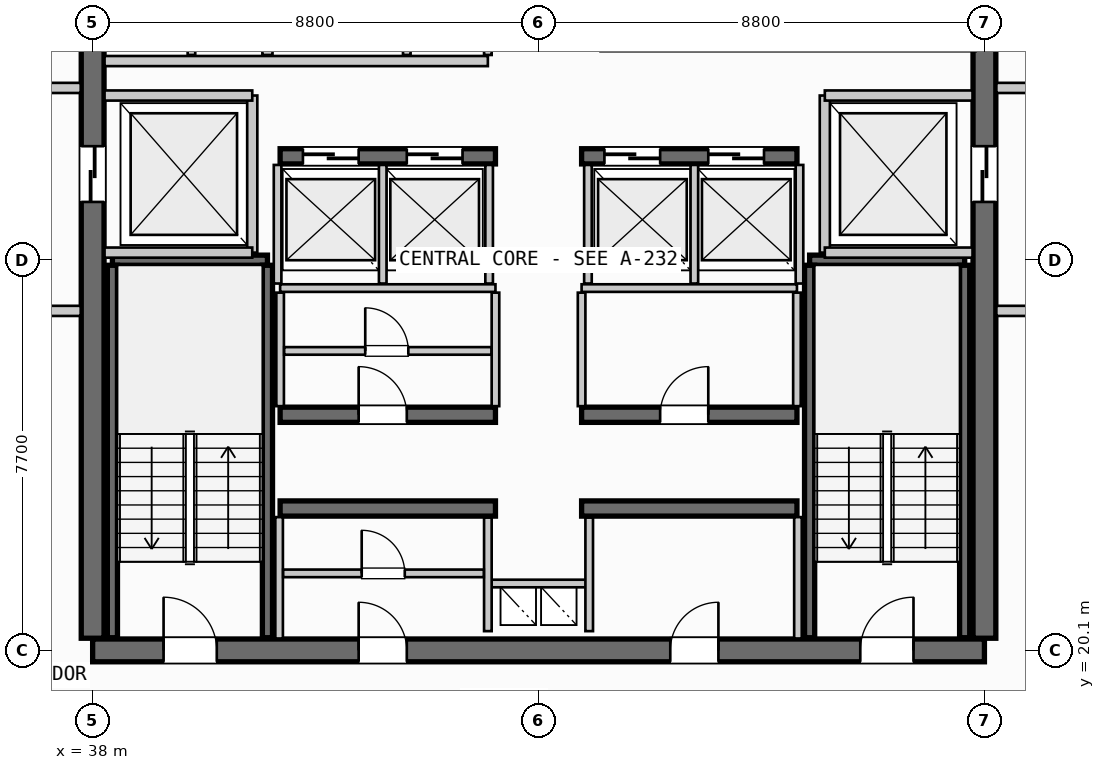
"""IFC4 building model, lengths in metres.
Left out: names, types, materials, properties, quantities, classifications, styles, units other than length and angle.
Written with IfcOpenShell. Run it as: python <this file> out.ifc"""

import sys

from ifc_helpers import new_model, si_unit, direction, frame, frame_2d, origin, place, context, subcontext, project, spatial, rectangle, extrude, source, transform, mapped, element, fill, save


model = new_model("IFC4")
c1 = context("Model", 3, precision=1e-05, world=origin(), true_north=direction((0.0, 1.0)))
c2 = subcontext(c1, "Body", "Model", "MODEL_VIEW")
j1 = project(units=[si_unit("LENGTHUNIT", "METRE"), si_unit("PLANEANGLEUNIT", "RADIAN")], contexts=[c1])
p1 = place(None, origin())
s1 = spatial("IfcSite", under=j1, at=p1, CompositionType="ELEMENT")
p2 = place(p1, origin())
s2 = spatial("IfcBuilding", under=s1, at=p2, CompositionType="ELEMENT")
p3 = place(p2, frame((0.0, 0.0, 231.85)))
s3 = spatial("IfcBuildingStorey", under=s2, at=p3, CompositionType="ELEMENT", Elevation=231.85)
p4 = place(p3, frame((38.0, 20.1, 0.0), z_axis=(0.0, 0.0, 1.0), x_axis=(1.0, 0.0, 0.0)))
e1 = element("IfcWall", 1, at=p4, inside=s3, PredefinedType="SHEAR", context=c2, shape_type="SweptSolid", body=[
    extrude(rectangle(XDim=17.6, YDim=0.45, at=frame_2d((8.8, 0.0))), origin(), (0.0, 0.0, 1.0), 3.21),
])
p5 = place(p4, frame((1.4, 0.0, 0.0)))
e2 = element("IfcOpeningElement", 2, at=p5, cuts=e1, PredefinedType="OPENING", context=c2, shape_type="SweptSolid", body=[
    extrude(rectangle(XDim=1.05, YDim=2.15, at=frame_2d((0.525, 1.075))), frame((0.0, 0.235, 0.0), z_axis=(0.0, -1.0, 0.0), x_axis=(1.0, 0.0, 0.0)), (0.0, 0.0, 1.0), 0.47),
])
p6 = place(p4, frame((15.15, 0.0, 0.0)))
e3 = element("IfcOpeningElement", 3, at=p6, cuts=e1, PredefinedType="OPENING", context=c2, shape_type="SweptSolid", body=[
    extrude(rectangle(XDim=1.05, YDim=2.15, at=frame_2d((0.525, 1.075))), frame((0.0, 0.235, 0.0), z_axis=(0.0, -1.0, 0.0), x_axis=(1.0, 0.0, 0.0)), (0.0, 0.0, 1.0), 0.47),
])
p7 = place(p4, frame((5.25, 0.0, 0.0)))
e4 = element("IfcOpeningElement", 4, at=p7, cuts=e1, PredefinedType="OPENING", context=c2, shape_type="SweptSolid", body=[
    extrude(rectangle(XDim=0.95, YDim=2.15, at=frame_2d((0.475, 1.075))), frame((0.0, 0.235, 0.0), z_axis=(0.0, -1.0, 0.0), x_axis=(1.0, 0.0, 0.0)), (0.0, 0.0, 1.0), 0.47),
])
p8 = place(p4, frame((11.4, 0.0, 0.0)))
e5 = element("IfcOpeningElement", 5, at=p8, cuts=e1, PredefinedType="OPENING", context=c2, shape_type="SweptSolid", body=[
    extrude(rectangle(XDim=0.95, YDim=2.15, at=frame_2d((0.475, 1.075))), frame((0.0, 0.235, 0.0), z_axis=(0.0, -1.0, 0.0), x_axis=(1.0, 0.0, 0.0)), (0.0, 0.0, 1.0), 0.47),
])
p9 = place(p3, frame((38.0, 35.26, 0.0), z_axis=(0.0, 0.0, 1.0), x_axis=(0.0, -1.0, 0.0)))
e6 = element("IfcWall", 6, at=p9, inside=s3, PredefinedType="SHEAR", context=c2, shape_type="SweptSolid", body=[
    extrude(rectangle(XDim=14.92, YDim=0.45, at=frame_2d((7.46, 0.0))), origin(), (0.0, 0.0, 1.0), 3.21),
])
p10 = place(p9, frame((5.21, 0.0, 0.0)))
e7 = element("IfcOpeningElement", 7, at=p10, cuts=e6, PredefinedType="OPENING", context=c2, shape_type="SweptSolid", body=[
    extrude(rectangle(XDim=1.1, YDim=2.2, at=frame_2d((0.55, 1.1))), frame((0.0, 0.235, 0.0), z_axis=(0.0, -1.0, 0.0), x_axis=(1.0, 0.0, 0.0)), (0.0, 0.0, 1.0), 0.47),
])
p11 = place(p3, frame((55.6, 20.34, 0.0), z_axis=(0.0, 0.0, 1.0), x_axis=(0.0, 1.0, 0.0)))
e8 = element("IfcWall", 8, at=p11, inside=s3, PredefinedType="SHEAR", context=c2, shape_type="SweptSolid", body=[
    extrude(rectangle(XDim=14.92, YDim=0.45, at=frame_2d((7.46, 0.0))), origin(), (0.0, 0.0, 1.0), 3.21),
])
p12 = place(p11, frame((12.71, 0.0, 0.0)))
e9 = element("IfcOpeningElement", 9, at=p12, cuts=e8, PredefinedType="OPENING", context=c2, shape_type="SweptSolid", body=[
    extrude(rectangle(XDim=1.05, YDim=2.15, at=frame_2d((0.525, 1.075))), frame((0.0, 0.235, 0.0), z_axis=(0.0, -1.0, 0.0), x_axis=(1.0, 0.0, 0.0)), (0.0, 0.0, 1.0), 0.47),
])
p13 = place(p11, frame((8.61, 0.0, 0.0)))
e10 = element("IfcOpeningElement", 10, at=p13, cuts=e8, PredefinedType="OPENING", context=c2, shape_type="SweptSolid", body=[
    extrude(rectangle(XDim=1.1, YDim=2.2, at=frame_2d((0.55, 1.1))), frame((0.0, 0.235, 0.0), z_axis=(0.0, -1.0, 0.0), x_axis=(1.0, 0.0, 0.0)), (0.0, 0.0, 1.0), 0.47),
])
for number, where, z_axis, x_axis in (
    (11, (41.7, 22.9, 0.0), (0.0, 0.0, 1.0), (1.0, 0.0, 0.0)),
    (12, (47.65, 22.9, 0.0), (0.0, 0.0, 1.0), (1.0, 0.0, 0.0)),
):
    element("IfcWall", number, at=place(p3, frame(where, z_axis=z_axis, x_axis=x_axis)), inside=s3, PredefinedType="SHEAR", context=c2, shape_type="SweptSolid", body=[
        extrude(rectangle(XDim=4.25, YDim=0.3, at=frame_2d((2.125, 0.0))), origin(), (0.0, 0.0, 1.0), 3.21),
    ])
p14 = place(p3, frame((41.7, 24.75, 0.0), z_axis=(0.0, 0.0, 1.0), x_axis=(1.0, 0.0, 0.0)))
e13 = element("IfcWall", 13, at=p14, inside=s3, PredefinedType="SHEAR", context=c2, shape_type="SweptSolid", body=[
    extrude(rectangle(XDim=4.25, YDim=0.3, at=frame_2d((2.125, 0.0))), origin(), (0.0, 0.0, 1.0), 3.21),
])
p15 = place(p14, frame((1.55, 0.0, 0.0)))
e14 = element("IfcOpeningElement", 14, at=p15, cuts=e13, PredefinedType="OPENING", context=c2, shape_type="SweptSolid", body=[
    extrude(rectangle(XDim=0.95, YDim=2.15, at=frame_2d((0.475, 1.075))), frame((0.0, 0.16, 0.0), z_axis=(0.0, -1.0, 0.0), x_axis=(1.0, 0.0, 0.0)), (0.0, 0.0, 1.0), 0.32),
])
p16 = place(p3, frame((47.65, 24.75, 0.0), z_axis=(0.0, 0.0, 1.0), x_axis=(1.0, 0.0, 0.0)))
e15 = element("IfcWall", 15, at=p16, inside=s3, PredefinedType="SHEAR", context=c2, shape_type="SweptSolid", body=[
    extrude(rectangle(XDim=4.25, YDim=0.3, at=frame_2d((2.125, 0.0))), origin(), (0.0, 0.0, 1.0), 3.21),
])
p17 = place(p16, frame((1.55, 0.0, 0.0)))
e16 = element("IfcOpeningElement", 16, at=p17, cuts=e15, PredefinedType="OPENING", context=c2, shape_type="SweptSolid", body=[
    extrude(rectangle(XDim=0.95, YDim=2.15, at=frame_2d((0.475, 1.075))), frame((0.0, 0.16, 0.0), z_axis=(0.0, -1.0, 0.0), x_axis=(1.0, 0.0, 0.0)), (0.0, 0.0, 1.0), 0.32),
])
p18 = place(p3, frame((41.7, 29.85, 0.0), z_axis=(0.0, 0.0, 1.0), x_axis=(1.0, 0.0, 0.0)))
e17 = element("IfcWall", 17, at=p18, inside=s3, PredefinedType="SHEAR", context=c2, shape_type="SweptSolid", body=[
    extrude(rectangle(XDim=4.25, YDim=0.3, at=frame_2d((2.125, 0.0))), origin(), (0.0, 0.0, 1.0), 3.21),
])
p19 = place(p18, frame((0.45, 0.0, 0.0)))
e18 = element("IfcOpeningElement", 18, at=p19, cuts=e17, PredefinedType="OPENING", context=c2, shape_type="SweptSolid", body=[
    extrude(rectangle(XDim=1.1, YDim=2.2, at=frame_2d((0.55, 1.1))), frame((0.0, 0.16, 0.0), z_axis=(0.0, -1.0, 0.0), x_axis=(1.0, 0.0, 0.0)), (0.0, 0.0, 1.0), 0.32),
])
p20 = place(p18, frame((2.5, 0.0, 0.0)))
e19 = element("IfcOpeningElement", 19, at=p20, cuts=e17, PredefinedType="OPENING", context=c2, shape_type="SweptSolid", body=[
    extrude(rectangle(XDim=1.1, YDim=2.2, at=frame_2d((0.55, 1.1))), frame((0.0, 0.16, 0.0), z_axis=(0.0, -1.0, 0.0), x_axis=(1.0, 0.0, 0.0)), (0.0, 0.0, 1.0), 0.32),
])
p21 = place(p3, frame((47.65, 29.85, 0.0), z_axis=(0.0, 0.0, 1.0), x_axis=(1.0, 0.0, 0.0)))
e20 = element("IfcWall", 20, at=p21, inside=s3, PredefinedType="SHEAR", context=c2, shape_type="SweptSolid", body=[
    extrude(rectangle(XDim=4.25, YDim=0.3, at=frame_2d((2.125, 0.0))), origin(), (0.0, 0.0, 1.0), 3.21),
])
p22 = place(p21, frame((0.45, 0.0, 0.0)))
e21 = element("IfcOpeningElement", 21, at=p22, cuts=e20, PredefinedType="OPENING", context=c2, shape_type="SweptSolid", body=[
    extrude(rectangle(XDim=1.1, YDim=2.2, at=frame_2d((0.55, 1.1))), frame((0.0, 0.16, 0.0), z_axis=(0.0, -1.0, 0.0), x_axis=(1.0, 0.0, 0.0)), (0.0, 0.0, 1.0), 0.32),
])
p23 = place(p21, frame((2.5, 0.0, 0.0)))
e22 = element("IfcOpeningElement", 22, at=p23, cuts=e20, PredefinedType="OPENING", context=c2, shape_type="SweptSolid", body=[
    extrude(rectangle(XDim=1.1, YDim=2.2, at=frame_2d((0.55, 1.1))), frame((0.0, 0.16, 0.0), z_axis=(0.0, -1.0, 0.0), x_axis=(1.0, 0.0, 0.0)), (0.0, 0.0, 1.0), 0.32),
])
p24 = place(p3, frame((38.39, 27.8, 0.0), z_axis=(0.0, 0.0, 1.0), x_axis=(1.0, 0.0, 0.0)))
e23 = element("IfcWall", 23, at=p24, inside=s3, PredefinedType="SHEAR", context=c2, shape_type="SweptSolid", body=[
    extrude(rectangle(XDim=3.06, YDim=0.2, at=frame_2d((1.53, 0.0))), origin(), (0.0, 0.0, 1.0), 3.21),
])
for number, where, z_axis, x_axis in (
    (24, (41.45, 27.7, 0.0), (0.0, 0.0, 1.0), (0.0, -1.0, 0.0)),
    (25, (38.39, 20.35, 0.0), (0.0, 0.0, 1.0), (0.0, 1.0, 0.0)),
):
    element("IfcWall", number, at=place(p3, frame(where, z_axis=z_axis, x_axis=x_axis)), inside=s3, PredefinedType="SHEAR", context=c2, shape_type="SweptSolid", body=[
        extrude(rectangle(XDim=7.35, YDim=0.2, at=frame_2d((3.675, 0.0))), origin(), (0.0, 0.0, 1.0), 3.21),
    ])
p25 = place(p3, frame((52.15, 27.8, 0.0), z_axis=(0.0, 0.0, 1.0), x_axis=(1.0, 0.0, 0.0)))
e26 = element("IfcWall", 26, at=p25, inside=s3, PredefinedType="SHEAR", context=c2, shape_type="SweptSolid", body=[
    extrude(rectangle(XDim=3.06, YDim=0.2, at=frame_2d((1.53, 0.0))), origin(), (0.0, 0.0, 1.0), 3.21),
])
for number, where, z_axis, x_axis in (
    (27, (55.21, 27.7, 0.0), (0.0, 0.0, 1.0), (0.0, -1.0, 0.0)),
    (28, (52.15, 20.35, 0.0), (0.0, 0.0, 1.0), (0.0, 1.0, 0.0)),
):
    element("IfcWall", number, at=place(p3, frame(where, z_axis=z_axis, x_axis=x_axis)), inside=s3, PredefinedType="SHEAR", context=c2, shape_type="SweptSolid", body=[
        extrude(rectangle(XDim=7.35, YDim=0.2, at=frame_2d((3.675, 0.0))), origin(), (0.0, 0.0, 1.0), 3.21),
    ])
p26 = place(p3, frame((45.8, 21.42, 0.0), z_axis=(0.0, 0.0, 1.0), x_axis=(1.0, 0.0, 0.0)))
e29 = element("IfcWall", 29, at=p26, inside=s3, PredefinedType="PARTITIONING", context=c2, shape_type="SweptSolid", body=[
    extrude(rectangle(XDim=2.0, YDim=0.15, at=frame_2d((1.0, 0.0))), origin(), (0.0, 0.0, 1.0), 2.28),
])
for number, where, z_axis, x_axis in (
    (30, (45.8, 20.48, 0.0), (0.0, 0.0, 1.0), (0.0, 1.0, 0.0)),
    (31, (47.8, 20.48, 0.0), (0.0, 0.0, 1.0), (0.0, 1.0, 0.0)),
):
    element("IfcWall", number, at=place(p3, frame(where, z_axis=z_axis, x_axis=x_axis)), inside=s3, PredefinedType="PARTITIONING", context=c2, shape_type="SweptSolid", body=[
        extrude(rectangle(XDim=2.24, YDim=0.15, at=frame_2d((1.12, 0.0))), origin(), (0.0, 0.0, 1.0), 2.28),
    ])
p27 = place(p3, frame((41.15, 27.95, 0.0), z_axis=(0.0, 0.0, 1.0), x_axis=(0.0, 1.0, 0.0)))
e32 = element("IfcWall", 32, at=p27, inside=s3, PredefinedType="PARTITIONING", context=c2, shape_type="SweptSolid", body=[
    extrude(rectangle(XDim=3.1, YDim=0.2, at=frame_2d((1.55, 0.0))), origin(), (0.0, 0.0, 1.0), 2.28),
])
for number, where, z_axis, x_axis in (
    (33, (38.235, 27.95, 0.0), (0.0, 0.0, 1.0), (1.0, 0.0, 0.0)),
    (34, (38.235, 31.05, 0.0), (0.0, 0.0, 1.0), (1.0, 0.0, 0.0)),
):
    element("IfcWall", number, at=place(p3, frame(where, z_axis=z_axis, x_axis=x_axis)), inside=s3, PredefinedType="PARTITIONING", context=c2, shape_type="SweptSolid", body=[
        extrude(rectangle(XDim=2.915, YDim=0.2, at=frame_2d((1.458, 0.0))), origin(), (0.0, 0.0, 1.0), 2.28),
    ])
for number, where, z_axis, x_axis in (
    (35, (34.5, 26.8, 0.0), (0.0, 0.0, 1.0), (1.0, 0.0, 0.0)),
    (36, (34.5, 31.2, 0.0), (0.0, 0.0, 1.0), (1.0, 0.0, 0.0)),
):
    element("IfcWall", number, at=place(p3, frame(where, z_axis=z_axis, x_axis=x_axis)), inside=s3, PredefinedType="PARTITIONING", context=c2, shape_type="SweptSolid", body=[
        extrude(rectangle(XDim=3.265, YDim=0.2, at=frame_2d((1.632, 0.0))), origin(), (0.0, 0.0, 1.0), 2.28),
    ])
p28 = place(p3, frame((52.45, 27.95, 0.0), z_axis=(0.0, 0.0, 1.0), x_axis=(0.0, 1.0, 0.0)))
e37 = element("IfcWall", 37, at=p28, inside=s3, PredefinedType="PARTITIONING", context=c2, shape_type="SweptSolid", body=[
    extrude(rectangle(XDim=3.1, YDim=0.2, at=frame_2d((1.55, 0.0))), origin(), (0.0, 0.0, 1.0), 2.28),
])
for number, where, z_axis, x_axis in (
    (38, (52.45, 27.95, 0.0), (0.0, 0.0, 1.0), (1.0, 0.0, 0.0)),
    (39, (52.45, 31.05, 0.0), (0.0, 0.0, 1.0), (1.0, 0.0, 0.0)),
):
    element("IfcWall", number, at=place(p3, frame(where, z_axis=z_axis, x_axis=x_axis)), inside=s3, PredefinedType="PARTITIONING", context=c2, shape_type="SweptSolid", body=[
        extrude(rectangle(XDim=2.915, YDim=0.2, at=frame_2d((1.458, 0.0))), origin(), (0.0, 0.0, 1.0), 2.28),
    ])
for number, where, z_axis, x_axis in (
    (40, (55.835, 26.8, 0.0), (0.0, 0.0, 1.0), (1.0, 0.0, 0.0)),
    (41, (55.835, 31.2, 0.0), (0.0, 0.0, 1.0), (1.0, 0.0, 0.0)),
):
    element("IfcWall", number, at=place(p3, frame(where, z_axis=z_axis, x_axis=x_axis)), inside=s3, PredefinedType="PARTITIONING", context=c2, shape_type="SweptSolid", body=[
        extrude(rectangle(XDim=3.265, YDim=0.2, at=frame_2d((1.633, 0.0))), origin(), (0.0, 0.0, 1.0), 2.28),
    ])
for number, where, z_axis, x_axis in (
    (42, (41.68, 20.335, 0.0), (0.0, 0.0, 1.0), (0.0, 1.0, 0.0)),
    (43, (51.92, 20.335, 0.0), (0.0, 0.0, 1.0), (0.0, 1.0, 0.0)),
):
    element("IfcWall", number, at=place(p3, frame(where, z_axis=z_axis, x_axis=x_axis)), inside=s3, PredefinedType="PARTITIONING", context=c2, shape_type="SweptSolid", body=[
        extrude(rectangle(XDim=2.395, YDim=0.15, at=frame_2d((1.198, 0.0))), origin(), (0.0, 0.0, 1.0), 2.28),
    ])
p29 = place(p3, frame((41.76, 21.62, 0.0), z_axis=(0.0, 0.0, 1.0), x_axis=(1.0, 0.0, 0.0)))
e44 = element("IfcWall", 44, at=p29, inside=s3, PredefinedType="PARTITIONING", context=c2, shape_type="SweptSolid", body=[
    extrude(rectangle(XDim=3.96, YDim=0.15, at=frame_2d((1.98, 0.0))), origin(), (0.0, 0.0, 1.0), 2.28),
])
p30 = place(p29, frame((1.55, 0.0, 0.0)))
e45 = element("IfcOpeningElement", 45, at=p30, cuts=e44, PredefinedType="OPENING", context=c2, shape_type="SweptSolid", body=[
    extrude(rectangle(XDim=0.85, YDim=2.15, at=frame_2d((0.425, 1.075))), frame((0.0, 0.085, 0.0), z_axis=(0.0, -1.0, 0.0), x_axis=(1.0, 0.0, 0.0)), (0.0, 0.0, 1.0), 0.17),
])
for number, where, z_axis, x_axis in (
    (46, (41.7, 27.25, 0.0), (0.0, 0.0, 1.0), (1.0, 0.0, 0.0)),
    (47, (47.65, 27.25, 0.0), (0.0, 0.0, 1.0), (1.0, 0.0, 0.0)),
):
    element("IfcWall", number, at=place(p3, frame(where, z_axis=z_axis, x_axis=x_axis)), inside=s3, PredefinedType="PARTITIONING", context=c2, shape_type="SweptSolid", body=[
        extrude(rectangle(XDim=4.25, YDim=0.15, at=frame_2d((2.125, 0.0))), origin(), (0.0, 0.0, 1.0), 2.28),
    ])
for number, where, z_axis, x_axis in (
    (48, (41.7, 24.92, 0.0), (0.0, 0.0, 1.0), (0.0, 1.0, 0.0)),
    (49, (45.95, 24.92, 0.0), (0.0, 0.0, 1.0), (0.0, 1.0, 0.0)),
    (50, (47.65, 24.92, 0.0), (0.0, 0.0, 1.0), (0.0, 1.0, 0.0)),
    (51, (51.9, 24.92, 0.0), (0.0, 0.0, 1.0), (0.0, 1.0, 0.0)),
):
    element("IfcWall", number, at=place(p3, frame(where, z_axis=z_axis, x_axis=x_axis)), inside=s3, PredefinedType="PARTITIONING", context=c2, shape_type="SweptSolid", body=[
        extrude(rectangle(XDim=2.24, YDim=0.15, at=frame_2d((1.12, 0.0))), origin(), (0.0, 0.0, 1.0), 2.28),
    ])
p31 = place(p3, frame((41.78, 26.01, 0.0), z_axis=(0.0, 0.0, 1.0), x_axis=(1.0, 0.0, 0.0)))
e52 = element("IfcWall", 52, at=p31, inside=s3, PredefinedType="PARTITIONING", context=c2, shape_type="SweptSolid", body=[
    extrude(rectangle(XDim=4.09, YDim=0.15, at=frame_2d((2.045, 0.0))), origin(), (0.0, 0.0, 1.0), 2.28),
])
p32 = place(p31, frame((1.6, 0.0, 0.0)))
e53 = element("IfcOpeningElement", 53, at=p32, cuts=e52, PredefinedType="OPENING", context=c2, shape_type="SweptSolid", body=[
    extrude(rectangle(XDim=0.85, YDim=2.15, at=frame_2d((0.425, 1.075))), frame((0.0, 0.085, 0.0), z_axis=(0.0, -1.0, 0.0), x_axis=(1.0, 0.0, 0.0)), (0.0, 0.0, 1.0), 0.17),
])
for number, where, z_axis, x_axis in (
    (54, (41.65, 27.34, 0.0), (0.0, 0.0, 1.0), (0.0, 1.0, 0.0)),
    (55, (43.725, 27.34, 0.0), (0.0, 0.0, 1.0), (0.0, 1.0, 0.0)),
    (56, (45.825, 27.34, 0.0), (0.0, 0.0, 1.0), (0.0, 1.0, 0.0)),
    (57, (47.775, 27.34, 0.0), (0.0, 0.0, 1.0), (0.0, 1.0, 0.0)),
    (58, (49.875, 27.34, 0.0), (0.0, 0.0, 1.0), (0.0, 1.0, 0.0)),
    (59, (51.95, 27.34, 0.0), (0.0, 0.0, 1.0), (0.0, 1.0, 0.0)),
):
    element("IfcWall", number, at=place(p3, frame(where, z_axis=z_axis, x_axis=x_axis)), inside=s3, PredefinedType="PARTITIONING", context=c2, shape_type="SweptSolid", body=[
        extrude(rectangle(XDim=2.34, YDim=0.15, at=frame_2d((1.17, 0.0))), origin(), (0.0, 0.0, 1.0), 2.28),
    ])
p33 = place(p3, frame((41.45, 31.85, 0.0), z_axis=(0.0, 0.0, 1.0), x_axis=(0.0, 1.0, 0.0)))
e60 = element("IfcWall", 60, at=p33, inside=s3, PredefinedType="PARTITIONING", context=c2, shape_type="SweptSolid", body=[
    extrude(rectangle(XDim=3.415, YDim=0.2, at=frame_2d((1.708, 0.0))), origin(), (0.0, 0.0, 1.0), 2.28),
])
p34 = place(p3, frame((38.235, 31.73, 0.0), z_axis=(0.0, 0.0, 1.0), x_axis=(1.0, 0.0, 0.0)))
e61 = element("IfcWall", 61, at=p34, inside=s3, PredefinedType="PARTITIONING", context=c2, shape_type="SweptSolid", body=[
    extrude(rectangle(XDim=7.565, YDim=0.2, at=frame_2d((3.782, 0.0))), origin(), (0.0, 0.0, 1.0), 2.28),
])
for number, where, z_axis, x_axis in (
    (62, (45.8, 31.85, 0.0), (0.0, 0.0, 1.0), (0.0, 1.0, 0.0)),
    (63, (39.95, 31.85, 0.0), (0.0, 0.0, 1.0), (0.0, 1.0, 0.0)),
):
    element("IfcWall", number, at=place(p3, frame(where, z_axis=z_axis, x_axis=x_axis)), inside=s3, PredefinedType="PARTITIONING", context=c2, shape_type="SweptSolid", body=[
        extrude(rectangle(XDim=3.415, YDim=0.15, at=frame_2d((1.708, 0.0))), origin(), (0.0, 0.0, 1.0), 2.28),
    ])
p35 = place(p3, frame((44.2, 31.85, 0.0), z_axis=(0.0, 0.0, 1.0), x_axis=(0.0, 1.0, 0.0)))
e64 = element("IfcWall", 64, at=p35, inside=s3, PredefinedType="PLUMBINGWALL", context=c2, shape_type="SweptSolid", body=[
    extrude(rectangle(XDim=3.415, YDim=0.15, at=frame_2d((1.708, 0.0))), origin(), (0.0, 0.0, 1.0), 2.28),
])
m1 = source(origin(), c2, "Body", "SweptSolid", [
    extrude(rectangle(XDim=1.05, YDim=2.15, at=frame_2d((0.525, 1.075))), frame((0.0, 0.025, 0.0), z_axis=(0.0, -1.0, 0.0), x_axis=(1.0, 0.0, 0.0)), (0.0, 0.0, 1.0), 0.05),
])
p36 = place(p5, origin())
e65 = element("IfcDoor", 65, at=p36, inside=s3, OperationType="SINGLE_SWING_LEFT", PredefinedType="DOOR", context=c2, shape_type="MappedRepresentation", body=[
    mapped(m1, transform((0.0, 0.0, 0.0), scale=1.0)),
])
fill(e2, e65)
p37 = place(p6, origin())
e66 = element("IfcDoor", 66, at=p37, inside=s3, OperationType="SINGLE_SWING_RIGHT", PredefinedType="DOOR", context=c2, shape_type="MappedRepresentation", body=[
    mapped(m1, transform((0.0, 0.0, 0.0), scale=1.0)),
])
fill(e3, e66)
m2 = source(origin(), c2, "Body", "SweptSolid", [
    extrude(rectangle(XDim=1.1, YDim=2.2, at=frame_2d((0.55, 1.1))), frame((0.0, 0.025, 0.0), z_axis=(0.0, -1.0, 0.0), x_axis=(1.0, 0.0, 0.0)), (0.0, 0.0, 1.0), 0.05),
])
p38 = place(p10, origin())
e67 = element("IfcDoor", 67, at=p38, inside=s3, OperationType="SLIDING_TO_LEFT", PredefinedType="DOOR", context=c2, shape_type="MappedRepresentation", body=[
    mapped(m2, transform((0.0, 0.0, 0.0), scale=1.0)),
])
fill(e7, e67)
p39 = place(p13, origin())
e68 = element("IfcDoor", 68, at=p39, inside=s3, OperationType="SLIDING_TO_RIGHT", PredefinedType="DOOR", context=c2, shape_type="MappedRepresentation", body=[
    mapped(m2, transform((0.0, 0.0, 0.0), scale=1.0)),
])
fill(e10, e68)
m3 = source(origin(), c2, "Body", "SweptSolid", [
    extrude(rectangle(XDim=0.95, YDim=2.15, at=frame_2d((0.475, 1.075))), frame((0.0, 0.025, 0.0), z_axis=(0.0, -1.0, 0.0), x_axis=(1.0, 0.0, 0.0)), (0.0, 0.0, 1.0), 0.05),
])
p40 = place(p7, origin())
e69 = element("IfcDoor", 69, at=p40, inside=s3, OperationType="SINGLE_SWING_LEFT", PredefinedType="DOOR", context=c2, shape_type="MappedRepresentation", body=[
    mapped(m3, transform((0.0, 0.0, 0.0), scale=1.0)),
])
fill(e4, e69)
p41 = place(p8, origin())
e70 = element("IfcDoor", 70, at=p41, inside=s3, OperationType="SINGLE_SWING_RIGHT", PredefinedType="DOOR", context=c2, shape_type="MappedRepresentation", body=[
    mapped(m3, transform((0.0, 0.0, 0.0), scale=1.0)),
])
fill(e5, e70)
p42 = place(p15, origin())
e71 = element("IfcDoor", 71, at=p42, inside=s3, OperationType="SINGLE_SWING_LEFT", PredefinedType="DOOR", context=c2, shape_type="MappedRepresentation", body=[
    mapped(m3, transform((0.0, 0.0, 0.0), scale=1.0)),
])
fill(e14, e71)
p43 = place(p17, origin())
e72 = element("IfcDoor", 72, at=p43, inside=s3, OperationType="SINGLE_SWING_RIGHT", PredefinedType="DOOR", context=c2, shape_type="MappedRepresentation", body=[
    mapped(m3, transform((0.0, 0.0, 0.0), scale=1.0)),
])
fill(e16, e72)
p44 = place(p19, origin())
e73 = element("IfcDoor", 73, at=p44, inside=s3, OperationType="SLIDING_TO_LEFT", PredefinedType="DOOR", context=c2, shape_type="MappedRepresentation", body=[
    mapped(m2, transform((0.0, 0.0, 0.0), scale=1.0)),
])
fill(e18, e73)
p45 = place(p20, origin())
e74 = element("IfcDoor", 74, at=p45, inside=s3, OperationType="SLIDING_TO_LEFT", PredefinedType="DOOR", context=c2, shape_type="MappedRepresentation", body=[
    mapped(m2, transform((0.0, 0.0, 0.0), scale=1.0)),
])
fill(e19, e74)
p46 = place(p22, origin())
e75 = element("IfcDoor", 75, at=p46, inside=s3, OperationType="SLIDING_TO_LEFT", PredefinedType="DOOR", context=c2, shape_type="MappedRepresentation", body=[
    mapped(m2, transform((0.0, 0.0, 0.0), scale=1.0)),
])
fill(e21, e75)
p47 = place(p23, origin())
e76 = element("IfcDoor", 76, at=p47, inside=s3, OperationType="SLIDING_TO_LEFT", PredefinedType="DOOR", context=c2, shape_type="MappedRepresentation", body=[
    mapped(m2, transform((0.0, 0.0, 0.0), scale=1.0)),
])
fill(e22, e76)
m4 = source(origin(), c2, "Body", "SweptSolid", [
    extrude(rectangle(XDim=0.85, YDim=2.15, at=frame_2d((0.425, 1.075))), frame((0.0, 0.025, 0.0), z_axis=(0.0, -1.0, 0.0), x_axis=(1.0, 0.0, 0.0)), (0.0, 0.0, 1.0), 0.05),
])
p48 = place(p30, origin())
e77 = element("IfcDoor", 77, at=p48, inside=s3, OperationType="SINGLE_SWING_LEFT", PredefinedType="DOOR", context=c2, shape_type="MappedRepresentation", body=[
    mapped(m4, transform((0.0, 0.0, 0.0), scale=1.0)),
])
fill(e45, e77)
p49 = place(p32, origin())
e78 = element("IfcDoor", 78, at=p49, inside=s3, OperationType="SINGLE_SWING_LEFT", PredefinedType="DOOR", context=c2, shape_type="MappedRepresentation", body=[
    mapped(m4, transform((0.0, 0.0, 0.0), scale=1.0)),
])
fill(e53, e78)
save(model, sys.argv[1])
